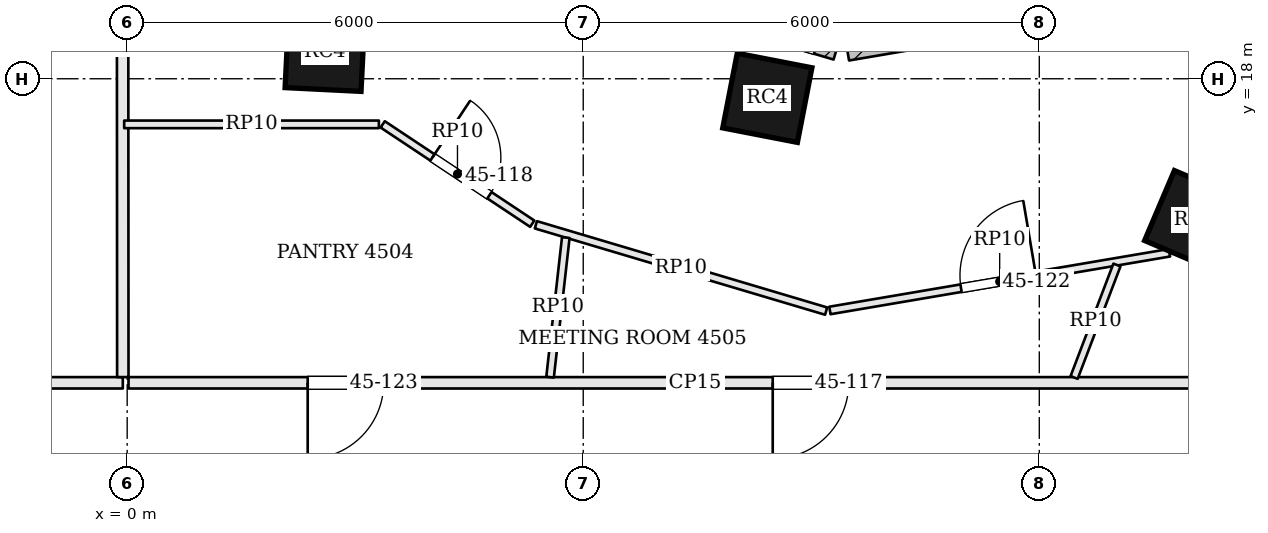
"""IFC4 building model, lengths in metres.
Left out: names, types, materials, properties, quantities, classifications, styles, units other than length and angle.
Written with IfcOpenShell. Run it as: python <this file> out.ifc"""

import sys

from ifc_helpers import new_model, si_unit, direction, frame, frame_2d, origin, origin_2d, place, context, subcontext, project, spatial, rectangle, extrude, element, fill, save


model = new_model("IFC4")
c1 = context("Model", 3, precision=1e-05, world=origin(), true_north=direction((0.0, 1.0)))
c2 = subcontext(c1, "Body", "Model", "MODEL_VIEW")
j1 = project(units=[si_unit("LENGTHUNIT", "METRE"), si_unit("PLANEANGLEUNIT", "RADIAN")], contexts=[c1])
p1 = place(None, origin())
s1 = spatial("IfcSite", under=j1, at=p1, CompositionType="ELEMENT")
p2 = place(p1, origin())
s2 = spatial("IfcBuilding", under=s1, at=p2, CompositionType="ELEMENT")
p3 = place(p2, frame((0.0, 0.0, 185.7)))
s3 = spatial("IfcBuildingStorey", under=s2, at=p3, CompositionType="ELEMENT", Elevation=185.7)
for number, where, z_axis, x_axis in (
    (1, (14.042, 16.136, 0.0), (0.0, 0.0, 1.0), (-0.92, 0.392, 0.0)),
    (2, (8.422, 17.749, 0.0), (0.0, 0.0, 1.0), (-0.982, 0.191, 0.0)),
    (3, (2.602, 18.358, 0.0), (0.0, 0.0, 1.0), (-0.999, 0.05, 0.0)),
):
    element("IfcColumn", number, at=place(p3, frame(where, z_axis=z_axis, x_axis=x_axis)), inside=s3, PredefinedType="COLUMN", context=c2, shape_type="SweptSolid", body=[
        extrude(rectangle(XDim=1.0, YDim=1.0, at=origin_2d()), origin(), (0.0, 0.0, 1.0), 3.9),
    ])
p4 = place(p3, frame((14.782, 19.367, 0.0), z_axis=(0.0, 0.0, 1.0), x_axis=(-0.98585584667, -0.167595493934, 0.0)))
e4 = element("IfcWall", 4, at=p4, inside=s3, PredefinedType="SOLIDWALL", context=c2, shape_type="SweptSolid", body=[
    extrude(rectangle(XDim=5.399, YDim=0.45, at=frame_2d((2.699, 0.0))), origin(), (0.0, 0.0, 1.0), 3.7),
])
p5 = place(p4, frame((1.649, 0.0, 0.9)))
e5 = element("IfcOpeningElement", 5, at=p5, cuts=e4, PredefinedType="OPENING", context=c2, shape_type="SweptSolid", body=[
    extrude(rectangle(XDim=2.1, YDim=2.3, at=frame_2d((1.05, 1.15))), frame((0.0, 0.235, 0.0), z_axis=(0.0, -1.0, 0.0), x_axis=(1.0, 0.0, 0.0)), (0.0, 0.0, 1.0), 0.47),
])
p6 = place(p3, frame((9.357, 18.469, 0.0), z_axis=(0.0, 0.0, 1.0), x_axis=(-0.958524054629, 0.285011643091, 0.0)))
e6 = element("IfcWall", 6, at=p6, inside=s3, PredefinedType="SOLIDWALL", context=c2, shape_type="SweptSolid", body=[
    extrude(rectangle(XDim=2.637, YDim=0.45, at=frame_2d((1.319, 0.0))), origin(), (0.0, 0.0, 1.0), 3.7),
])
p7 = place(p6, frame((0.269, 0.0, 0.9)))
e7 = element("IfcOpeningElement", 7, at=p7, cuts=e6, PredefinedType="OPENING", context=c2, shape_type="SweptSolid", body=[
    extrude(rectangle(XDim=2.1, YDim=2.3, at=frame_2d((1.05, 1.15))), frame((0.0, 0.235, 0.0), z_axis=(0.0, -1.0, 0.0), x_axis=(1.0, 0.0, 0.0)), (0.0, 0.0, 1.0), 0.47),
])
p8 = place(p3, frame((-0.057, 14.0, 0.0), z_axis=(0.0, 0.0, 1.0), x_axis=(-1.0, 0.0, 0.0)))
e8 = element("IfcWall", 8, at=p8, inside=s3, PredefinedType="PARTITIONING", context=c2, shape_type="SweptSolid", body=[
    extrude(rectangle(XDim=14.943, YDim=0.15, at=frame_2d((7.471, 0.0))), origin(), (0.0, 0.0, 1.0), 3.084),
])
p9 = place(p8, frame((11.582, 0.0, 0.0)))
e9 = element("IfcOpeningElement", 9, at=p9, cuts=e8, PredefinedType="OPENING", context=c2, shape_type="SweptSolid", body=[
    extrude(rectangle(XDim=1.8, YDim=2.1, at=frame_2d((0.9, 1.05))), frame((0.0, 0.085, 0.0), z_axis=(0.0, -1.0, 0.0), x_axis=(1.0, 0.0, 0.0)), (0.0, 0.0, 1.0), 0.17),
])
p10 = place(p3, frame((-0.062, 22.837, 0.0), z_axis=(0.0, 0.0, 1.0), x_axis=(0.000585104801, -0.999999828826, 0.0)))
e10 = element("IfcWall", 10, at=p10, inside=s3, PredefinedType="PARTITIONING", context=c2, shape_type="SweptSolid", body=[
    extrude(rectangle(XDim=8.762, YDim=0.15, at=frame_2d((4.381, 0.0))), origin(), (0.0, 0.0, 1.0), 3.084),
])
p11 = place(p3, frame((14.925, 14.0, 0.0), z_axis=(0.0, 0.0, 1.0), x_axis=(-1.0, 0.0, 0.0)))
e11 = element("IfcWall", 11, at=p11, inside=s3, PredefinedType="PARTITIONING", context=c2, shape_type="SweptSolid", body=[
    extrude(rectangle(XDim=14.907, YDim=0.15, at=frame_2d((7.454, 0.0))), origin(), (0.0, 0.0, 1.0), 3.084),
])
p12 = place(p11, frame((5.432, 0.0, 0.0)))
e12 = element("IfcOpeningElement", 12, at=p12, cuts=e11, PredefinedType="OPENING", context=c2, shape_type="SweptSolid", body=[
    extrude(rectangle(XDim=1.0, YDim=2.4, at=frame_2d((0.5, 1.2))), frame((0.0, 0.085, 0.0), z_axis=(0.0, -1.0, 0.0), x_axis=(1.0, 0.0, 0.0)), (0.0, 0.0, 1.0), 0.17),
])
p13 = place(p11, frame((11.55, 0.0, 0.0)))
e13 = element("IfcOpeningElement", 13, at=p13, cuts=e11, PredefinedType="OPENING", context=c2, shape_type="SweptSolid", body=[
    extrude(rectangle(XDim=1.0, YDim=2.1, at=frame_2d((0.5, 1.05))), frame((0.0, 0.085, 0.0), z_axis=(0.0, -1.0, 0.0), x_axis=(1.0, 0.0, 0.0)), (0.0, 0.0, 1.0), 0.17),
])
p14 = place(p3, frame((3.362, 17.4, 0.0), z_axis=(0.0, 0.0, 1.0), x_axis=(0.832987305186, -0.553292101335, 0.0)))
e14 = element("IfcWall", 14, at=p14, inside=s3, PredefinedType="PARTITIONING", context=c2, shape_type="SweptSolid", body=[
    extrude(rectangle(XDim=2.362, YDim=0.1, at=frame_2d((1.181, 0.0))), origin(), (0.0, 0.0, 1.0), 3.084),
])
p15 = place(p14, frame((0.786, 0.0, 0.0)))
e15 = element("IfcOpeningElement", 15, at=p15, cuts=e14, PredefinedType="OPENING", context=c2, shape_type="SweptSolid", body=[
    extrude(rectangle(XDim=0.9, YDim=2.1, at=frame_2d((0.45, 1.05))), frame((0.0, 0.06, 0.0), z_axis=(0.0, -1.0, 0.0), x_axis=(1.0, 0.0, 0.0)), (0.0, 0.0, 1.0), 0.12),
])
p16 = place(p3, frame((5.377, 16.079, 0.0), z_axis=(0.0, 0.0, 1.0), x_axis=(0.958503323659, -0.28508135424, 0.0)))
e16 = element("IfcWall", 16, at=p16, inside=s3, PredefinedType="PARTITIONING", context=c2, shape_type="SweptSolid", body=[
    extrude(rectangle(XDim=3.984, YDim=0.1, at=frame_2d((1.992, 0.0))), origin(), (0.0, 0.0, 1.0), 3.084),
])
p17 = place(p3, frame((9.245, 14.952, 0.0), z_axis=(0.0, 0.0, 1.0), x_axis=(0.985863233989, 0.167552033319, 0.0)))
e17 = element("IfcWall", 17, at=p17, inside=s3, PredefinedType="PARTITIONING", context=c2, shape_type="SweptSolid", body=[
    extrude(rectangle(XDim=4.531, YDim=0.1, at=frame_2d((2.266, 0.0))), origin(), (0.0, 0.0, 1.0), 3.084),
])
p18 = place(p17, frame((1.75, 0.0, 0.0)))
e18 = element("IfcOpeningElement", 18, at=p18, cuts=e17, PredefinedType="OPENING", context=c2, shape_type="SweptSolid", body=[
    extrude(rectangle(XDim=1.0, YDim=2.4, at=frame_2d((0.5, 1.2))), frame((0.0, 0.06, 0.0), z_axis=(0.0, -1.0, 0.0), x_axis=(1.0, 0.0, 0.0)), (0.0, 0.0, 1.0), 0.12),
])
p19 = place(p3, frame((-0.039, 17.4, 0.0), z_axis=(0.0, 0.0, 1.0), x_axis=(1.0, 0.0, 0.0)))
e19 = element("IfcWall", 19, at=p19, inside=s3, PredefinedType="PARTITIONING", context=c2, shape_type="SweptSolid", body=[
    extrude(rectangle(XDim=3.351, YDim=0.1, at=frame_2d((1.675, 0.0))), origin(), (0.0, 0.0, 1.0), 3.084),
])
p20 = place(p3, frame((12.458, 14.07, 0.0), z_axis=(0.0, 0.0, 1.0), x_axis=(0.3557324153, 0.934587849645, 0.0)))
e20 = element("IfcWall", 20, at=p20, inside=s3, PredefinedType="PARTITIONING", context=c2, shape_type="SweptSolid", body=[
    extrude(rectangle(XDim=1.583, YDim=0.1, at=frame_2d((0.792, 0.0))), origin(), (0.0, 0.0, 1.0), 3.084),
])
p21 = place(p3, frame((5.564, 14.074, 0.0), z_axis=(0.0, 0.0, 1.0), x_axis=(0.111925263738, 0.993716627282, 0.0)))
e21 = element("IfcWall", 21, at=p21, inside=s3, PredefinedType="PARTITIONING", context=c2, shape_type="SweptSolid", body=[
    extrude(rectangle(XDim=1.848, YDim=0.1, at=frame_2d((0.924, 0.0))), origin(), (0.0, 0.0, 1.0), 3.084),
])
p22 = place(p12, origin())
e22 = element("IfcDoor", 22, at=p22, inside=s3, OperationType="SINGLE_SWING_RIGHT", PredefinedType="DOOR", context=c2, shape_type="SweptSolid", body=[
    extrude(rectangle(XDim=1.0, YDim=2.4, at=frame_2d((0.5, 1.2))), frame((0.0, 0.025, 0.0), z_axis=(0.0, -1.0, 0.0), x_axis=(1.0, 0.0, 0.0)), (0.0, 0.0, 1.0), 0.05),
])
fill(e12, e22)
p23 = place(p15, origin())
e23 = element("IfcDoor", 23, at=p23, inside=s3, OperationType="SINGLE_SWING_LEFT", PredefinedType="DOOR", context=c2, shape_type="SweptSolid", body=[
    extrude(rectangle(XDim=0.9, YDim=2.1, at=frame_2d((0.45, 1.05))), frame((0.0, 0.025, 0.0), z_axis=(0.0, -1.0, 0.0), x_axis=(1.0, 0.0, 0.0)), (0.0, 0.0, 1.0), 0.05),
])
fill(e15, e23)
p24 = place(p18, origin())
e24 = element("IfcDoor", 24, at=p24, inside=s3, OperationType="SINGLE_SWING_RIGHT", PredefinedType="DOOR", context=c2, shape_type="SweptSolid", body=[
    extrude(rectangle(XDim=1.0, YDim=2.4, at=frame_2d((0.5, 1.2))), frame((0.0, 0.025, 0.0), z_axis=(0.0, -1.0, 0.0), x_axis=(1.0, 0.0, 0.0)), (0.0, 0.0, 1.0), 0.05),
])
fill(e18, e24)
p25 = place(p13, origin())
e25 = element("IfcDoor", 25, at=p25, inside=s3, OperationType="SINGLE_SWING_RIGHT", PredefinedType="DOOR", context=c2, shape_type="SweptSolid", body=[
    extrude(rectangle(XDim=1.0, YDim=2.1, at=frame_2d((0.5, 1.05))), frame((0.0, 0.025, 0.0), z_axis=(0.0, -1.0, 0.0), x_axis=(1.0, 0.0, 0.0)), (0.0, 0.0, 1.0), 0.05),
])
fill(e13, e25)
save(model, sys.argv[1])
